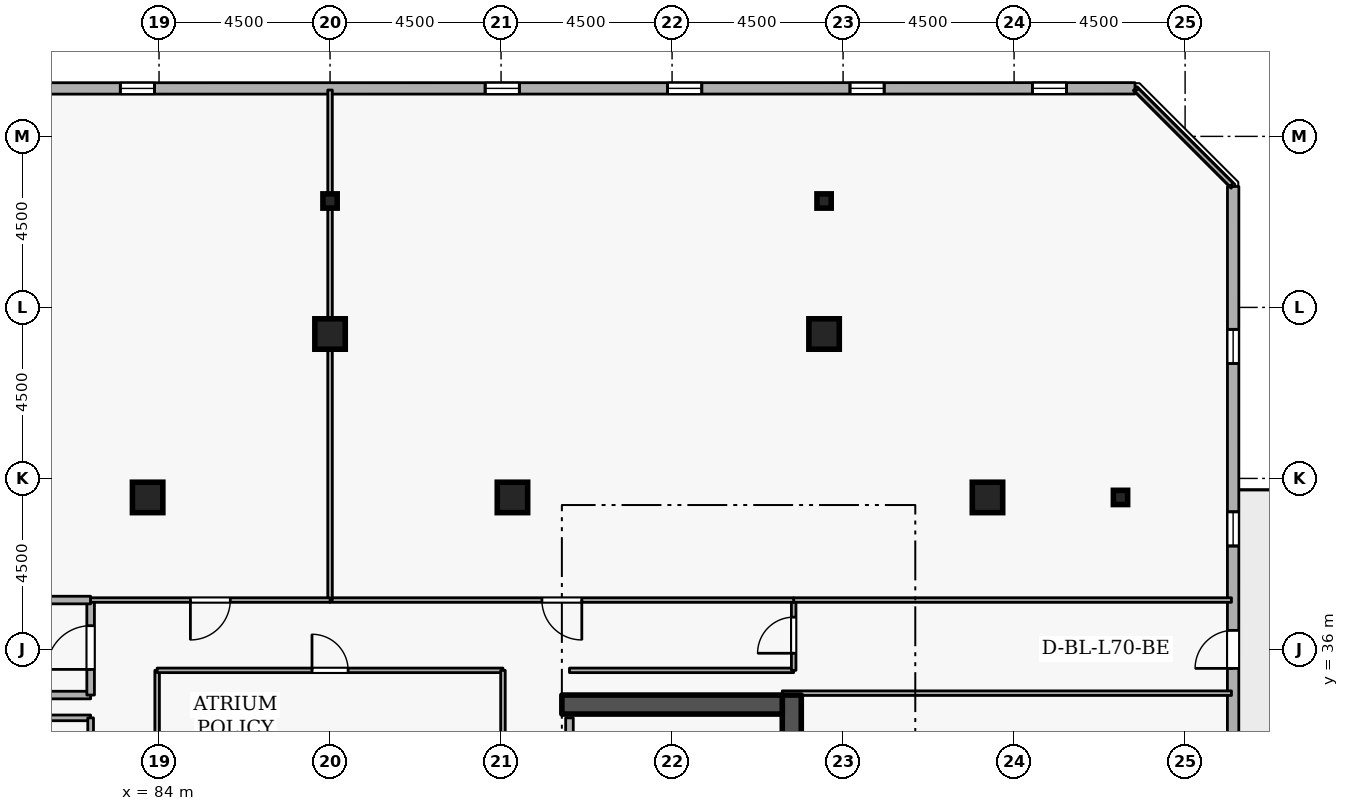
"""IFC4 building model, lengths in metres.
Left out: names, types, materials, properties, quantities, classifications, styles, units other than length and angle.
Written with IfcOpenShell. Run it as: python <this file> out.ifc"""

import sys

from ifc_helpers import new_model, si_unit, direction, frame, frame_2d, origin, origin_2d, place, context, subcontext, project, spatial, rectangle, i_section, extrude, element, fill, save


model = new_model("IFC4")
c1 = context("Model", 3, precision=1e-05, world=origin(), true_north=direction((0.0, 1.0)))
c2 = subcontext(c1, "Body", "Model", "MODEL_VIEW")
j1 = project(units=[si_unit("LENGTHUNIT", "METRE"), si_unit("PLANEANGLEUNIT", "RADIAN")], contexts=[c1])
p1 = place(None, origin())
s1 = spatial("IfcSite", under=j1, at=p1, CompositionType="ELEMENT")
p2 = place(p1, origin())
s2 = spatial("IfcBuilding", under=s1, at=p2, CompositionType="ELEMENT")
p3 = place(p2, frame((0.0, 0.0, 261.9)))
s3 = spatial("IfcBuildingStorey", under=s2, at=p3, CompositionType="ELEMENT", Elevation=261.9)
p4 = place(p3, frame((100.65, 19.2, 0.0), z_axis=(0.0, 0.0, 1.0), x_axis=(0.0, 1.0, 0.0)))
e1 = element("IfcWall", 1, at=p4, inside=s3, PredefinedType="SHEAR", context=c2, shape_type="SweptSolid", body=[
    extrude(rectangle(XDim=15.6, YDim=0.5, at=frame_2d((7.8, 0.0))), origin(), (0.0, 0.0, 1.0), 3.6),
])
p5 = place(p3, frame((94.6, 34.55, 0.0), z_axis=(0.0, 0.0, 1.0), x_axis=(1.0, 0.0, 0.0)))
e2 = element("IfcWall", 2, at=p5, inside=s3, PredefinedType="SHEAR", context=c2, shape_type="SweptSolid", body=[
    extrude(rectangle(XDim=5.8, YDim=0.5, at=frame_2d((2.9, 0.0))), origin(), (0.0, 0.0, 1.0), 3.6),
])
for number, where, z_axis, x_axis in (
    (3, (105.8, 40.0, 0.0), (0.0, 0.0, 1.0), (1.0, 0.0, 0.0)),
    (4, (101.5, 44.3, 0.0), (0.0, 0.0, 1.0), (1.0, 0.0, 0.0)),
    (5, (88.5, 44.3, 0.0), (0.0, 0.0, 1.0), (1.0, 0.0, 0.0)),
    (6, (93.3, 40.0, 0.0), (0.0, 0.0, 1.0), (1.0, 0.0, 0.0)),
    (7, (83.7, 40.0, 0.0), (0.0, 0.0, 1.0), (1.0, 0.0, 0.0)),
):
    element("IfcColumn", number, at=place(p3, frame(where, z_axis=z_axis, x_axis=x_axis)), inside=s3, PredefinedType="COLUMN", context=c2, shape_type="SweptSolid", body=[
        extrude(rectangle(XDim=0.8, YDim=0.8, at=origin_2d()), origin(), (0.0, 0.0, 1.0), 3.6),
    ])
for number, where, z_axis, x_axis in (
    (8, (109.3, 40.0, 0.0), (0.0, 0.0, 1.0), (1.0, 0.0, 0.0)),
    (9, (101.5, 47.8, 0.0), (0.0, 0.0, 1.0), (1.0, 0.0, 0.0)),
    (10, (88.5, 47.8, 0.0), (0.0, 0.0, 1.0), (1.0, 0.0, 0.0)),
):
    element("IfcColumn", number, at=place(p3, frame(where, z_axis=z_axis, x_axis=x_axis)), inside=s3, PredefinedType="COLUMN", context=c2, shape_type="SweptSolid", body=[
        extrude(i_section(OverallWidth=0.375, OverallDepth=0.375, WebThickness=0.017, FlangeThickness=0.027, FilletRadius=0.015, at=origin_2d()), origin(), (0.0, 0.0, 1.0), 3.6),
    ])
p6 = place(p3, frame((112.261, 12.922, 0.0), z_axis=(0.0, 0.0, 1.0), x_axis=(0.000103863011, 0.999999994606, 0.0)))
e11 = element("IfcWall", 11, at=p6, inside=s3, PredefinedType="STANDARD", context=c2, shape_type="SweptSolid", body=[
    extrude(rectangle(XDim=35.259, YDim=0.3, at=frame_2d((17.629, 0.0))), origin(), (0.0, 0.0, 1.0), 2.7),
])
p7 = place(p6, frame((22.58, 0.0, 0.0)))
e12 = element("IfcOpeningElement", 12, at=p7, cuts=e11, PredefinedType="OPENING", context=c2, shape_type="SweptSolid", body=[
    extrude(rectangle(XDim=1.0, YDim=2.08, at=frame_2d((0.5, 1.04))), frame((0.0, 0.16, 0.0), z_axis=(0.0, -1.0, 0.0), x_axis=(1.0, 0.0, 0.0)), (0.0, 0.0, 1.0), 0.32),
])
p8 = place(p6, frame((1.8, 0.0, 0.72)))
e13 = element("IfcOpeningElement", 13, at=p8, cuts=e11, PredefinedType="OPENING", context=c2, shape_type="SweptSolid", body=[
    extrude(rectangle(XDim=0.9, YDim=1.75, at=frame_2d((0.45, 0.875))), frame((0.0, 0.16, 0.0), z_axis=(0.0, -1.0, 0.0), x_axis=(1.0, 0.0, 0.0)), (0.0, 0.0, 1.0), 0.32),
])
p9 = place(p6, frame((6.6, 0.0, 0.72)))
e14 = element("IfcOpeningElement", 14, at=p9, cuts=e11, PredefinedType="OPENING", context=c2, shape_type="SweptSolid", body=[
    extrude(rectangle(XDim=0.9, YDim=1.75, at=frame_2d((0.45, 0.875))), frame((0.0, 0.16, 0.0), z_axis=(0.0, -1.0, 0.0), x_axis=(1.0, 0.0, 0.0)), (0.0, 0.0, 1.0), 0.32),
])
p10 = place(p6, frame((11.4, 0.0, 0.72)))
e15 = element("IfcOpeningElement", 15, at=p10, cuts=e11, PredefinedType="OPENING", context=c2, shape_type="SweptSolid", body=[
    extrude(rectangle(XDim=0.9, YDim=1.75, at=frame_2d((0.45, 0.875))), frame((0.0, 0.16, 0.0), z_axis=(0.0, -1.0, 0.0), x_axis=(1.0, 0.0, 0.0)), (0.0, 0.0, 1.0), 0.32),
])
p11 = place(p6, frame((16.2, 0.0, 0.72)))
e16 = element("IfcOpeningElement", 16, at=p11, cuts=e11, PredefinedType="OPENING", context=c2, shape_type="SweptSolid", body=[
    extrude(rectangle(XDim=0.9, YDim=1.75, at=frame_2d((0.45, 0.875))), frame((0.0, 0.16, 0.0), z_axis=(0.0, -1.0, 0.0), x_axis=(1.0, 0.0, 0.0)), (0.0, 0.0, 1.0), 0.32),
])
p12 = place(p6, frame((25.8, 0.0, 0.72)))
e17 = element("IfcOpeningElement", 17, at=p12, cuts=e11, PredefinedType="OPENING", context=c2, shape_type="SweptSolid", body=[
    extrude(rectangle(XDim=0.9, YDim=1.75, at=frame_2d((0.45, 0.875))), frame((0.0, 0.16, 0.0), z_axis=(0.0, -1.0, 0.0), x_axis=(1.0, 0.0, 0.0)), (0.0, 0.0, 1.0), 0.32),
])
p13 = place(p6, frame((30.6, 0.0, 0.72)))
e18 = element("IfcOpeningElement", 18, at=p13, cuts=e11, PredefinedType="OPENING", context=c2, shape_type="SweptSolid", body=[
    extrude(rectangle(XDim=0.9, YDim=1.75, at=frame_2d((0.45, 0.875))), frame((0.0, 0.16, 0.0), z_axis=(0.0, -1.0, 0.0), x_axis=(1.0, 0.0, 0.0)), (0.0, 0.0, 1.0), 0.32),
])
p14 = place(p3, frame((109.681, 50.765, 0.0), z_axis=(0.0, 0.0, 1.0), x_axis=(-0.999999994606, -0.000103863011, 0.0)))
e19 = element("IfcWall", 19, at=p14, inside=s3, PredefinedType="STANDARD", context=c2, shape_type="SweptSolid", body=[
    extrude(rectangle(XDim=35.259, YDim=0.3, at=frame_2d((17.629, 0.0))), origin(), (0.0, 0.0, 1.0), 2.7),
])
p15 = place(p14, frame((1.8, 0.0, 0.72)))
e20 = element("IfcOpeningElement", 20, at=p15, cuts=e19, PredefinedType="OPENING", context=c2, shape_type="SweptSolid", body=[
    extrude(rectangle(XDim=0.9, YDim=1.75, at=frame_2d((0.45, 0.875))), frame((0.0, 0.16, 0.0), z_axis=(0.0, -1.0, 0.0), x_axis=(1.0, 0.0, 0.0)), (0.0, 0.0, 1.0), 0.32),
])
p16 = place(p14, frame((6.6, 0.0, 0.72)))
e21 = element("IfcOpeningElement", 21, at=p16, cuts=e19, PredefinedType="OPENING", context=c2, shape_type="SweptSolid", body=[
    extrude(rectangle(XDim=0.9, YDim=1.75, at=frame_2d((0.45, 0.875))), frame((0.0, 0.16, 0.0), z_axis=(0.0, -1.0, 0.0), x_axis=(1.0, 0.0, 0.0)), (0.0, 0.0, 1.0), 0.32),
])
p17 = place(p14, frame((11.4, 0.0, 0.72)))
e22 = element("IfcOpeningElement", 22, at=p17, cuts=e19, PredefinedType="OPENING", context=c2, shape_type="SweptSolid", body=[
    extrude(rectangle(XDim=0.9, YDim=1.75, at=frame_2d((0.45, 0.875))), frame((0.0, 0.16, 0.0), z_axis=(0.0, -1.0, 0.0), x_axis=(1.0, 0.0, 0.0)), (0.0, 0.0, 1.0), 0.32),
])
p18 = place(p14, frame((16.2, 0.0, 0.72)))
e23 = element("IfcOpeningElement", 23, at=p18, cuts=e19, PredefinedType="OPENING", context=c2, shape_type="SweptSolid", body=[
    extrude(rectangle(XDim=0.9, YDim=1.75, at=frame_2d((0.45, 0.875))), frame((0.0, 0.16, 0.0), z_axis=(0.0, -1.0, 0.0), x_axis=(1.0, 0.0, 0.0)), (0.0, 0.0, 1.0), 0.32),
])
p19 = place(p14, frame((25.8, 0.0, 0.72)))
e24 = element("IfcOpeningElement", 24, at=p19, cuts=e19, PredefinedType="OPENING", context=c2, shape_type="SweptSolid", body=[
    extrude(rectangle(XDim=0.9, YDim=1.75, at=frame_2d((0.45, 0.875))), frame((0.0, 0.16, 0.0), z_axis=(0.0, -1.0, 0.0), x_axis=(1.0, 0.0, 0.0)), (0.0, 0.0, 1.0), 0.32),
])
p20 = place(p14, frame((30.6, 0.0, 0.72)))
e25 = element("IfcOpeningElement", 25, at=p20, cuts=e19, PredefinedType="OPENING", context=c2, shape_type="SweptSolid", body=[
    extrude(rectangle(XDim=0.9, YDim=1.75, at=frame_2d((0.45, 0.875))), frame((0.0, 0.16, 0.0), z_axis=(0.0, -1.0, 0.0), x_axis=(1.0, 0.0, 0.0)), (0.0, 0.0, 1.0), 0.32),
])
p21 = place(p3, frame((79.9, 34.8, 0.0), z_axis=(0.0, 0.0, 1.0), x_axis=(1.0, 0.0, 0.0)))
e26 = element("IfcWall", 26, at=p21, inside=s3, PredefinedType="STANDARD", context=c2, shape_type="SweptSolid", body=[
    extrude(rectangle(XDim=2.3, YDim=0.2, at=frame_2d((1.15, 0.0))), origin(), (0.0, 0.0, 1.0), 2.545),
])
p22 = place(p3, frame((82.2, 34.8, 0.0), z_axis=(0.0, 0.0, 1.0), x_axis=(0.0, 1.0, 0.0)))
e27 = element("IfcWall", 27, at=p22, inside=s3, PredefinedType="STANDARD", context=c2, shape_type="SweptSolid", body=[
    extrude(rectangle(XDim=2.5, YDim=0.2, at=frame_2d((1.25, 0.0))), origin(), (0.0, 0.0, 1.0), 3.34),
])
p23 = place(p22, frame((0.675, 0.0, 0.0)))
e28 = element("IfcOpeningElement", 28, at=p23, cuts=e27, PredefinedType="OPENING", context=c2, shape_type="SweptSolid", body=[
    extrude(rectangle(XDim=1.15, YDim=2.1, at=frame_2d((0.575, 1.05))), frame((0.0, 0.11, 0.0), z_axis=(0.0, -1.0, 0.0), x_axis=(1.0, 0.0, 0.0)), (0.0, 0.0, 1.0), 0.22),
])
p24 = place(p3, frame((82.2, 37.3, 0.0), z_axis=(0.0, 0.0, 1.0), x_axis=(-1.0, 0.0, 0.0)))
e29 = element("IfcWall", 29, at=p24, inside=s3, PredefinedType="STANDARD", context=c2, shape_type="SweptSolid", body=[
    extrude(rectangle(XDim=5.7, YDim=0.2, at=frame_2d((2.85, 0.0))), origin(), (0.0, 0.0, 1.0), 3.34),
])
p25 = place(p3, frame((94.8, 32.0, 0.0), z_axis=(0.0, 0.0, 1.0), x_axis=(0.0, 1.0, 0.0)))
e30 = element("IfcWall", 30, at=p25, inside=s3, PredefinedType="STANDARD", context=c2, shape_type="SweptSolid", body=[
    extrude(rectangle(XDim=2.2, YDim=0.2, at=frame_2d((1.1, 0.0))), origin(), (0.0, 0.0, 1.0), 3.34),
])
p26 = place(p25, frame((0.525, 0.0, 0.0)))
e31 = element("IfcOpeningElement", 31, at=p26, cuts=e30, PredefinedType="OPENING", context=c2, shape_type="SweptSolid", body=[
    extrude(rectangle(XDim=1.15, YDim=2.1, at=frame_2d((0.575, 1.05))), frame((0.0, 0.11, 0.0), z_axis=(0.0, -1.0, 0.0), x_axis=(1.0, 0.0, 0.0)), (0.0, 0.0, 1.0), 0.22),
])
p27 = place(p3, frame((80.15, 34.2, 0.0), z_axis=(0.0, 0.0, 1.0), x_axis=(1.0, 0.0, 0.0)))
e32 = element("IfcWall", 32, at=p27, inside=s3, PredefinedType="PARTITIONING", context=c2, shape_type="SweptSolid", body=[
    extrude(rectangle(XDim=2.05, YDim=0.15, at=frame_2d((1.025, 0.0))), origin(), (0.0, 0.0, 1.0), 2.545),
])
p28 = place(p3, frame((82.2, 34.2, 0.0), z_axis=(0.0, 0.0, 1.0), x_axis=(0.0, -1.0, 0.0)))
e33 = element("IfcWall", 33, at=p28, inside=s3, PredefinedType="PARTITIONING", context=c2, shape_type="SweptSolid", body=[
    extrude(rectangle(XDim=2.35, YDim=0.15, at=frame_2d((1.175, 0.0))), origin(), (0.0, 0.0, 1.0), 3.34),
])
p29 = place(p28, frame((0.715, 0.0, 0.0)))
e34 = element("IfcOpeningElement", 34, at=p29, cuts=e33, PredefinedType="OPENING", context=c2, shape_type="SweptSolid", body=[
    extrude(rectangle(XDim=0.92, YDim=2.08, at=frame_2d((0.46, 1.04))), frame((0.0, 0.085, 0.0), z_axis=(0.0, -1.0, 0.0), x_axis=(1.0, 0.0, 0.0)), (0.0, 0.0, 1.0), 0.17),
])
p30 = place(p3, frame((94.8, 35.45, 0.0), z_axis=(0.0, 0.0, 1.0), x_axis=(1.0, 0.0, 0.0)))
e35 = element("IfcWall", 35, at=p30, inside=s3, PredefinedType="PARTITIONING", context=c2, shape_type="SweptSolid", body=[
    extrude(rectangle(XDim=5.9, YDim=0.12, at=frame_2d((2.95, 0.0))), origin(), (0.0, 0.0, 1.0), 3.34),
])
p31 = place(p3, frame((100.7, 35.45, 0.0), z_axis=(0.0, 0.0, 1.0), x_axis=(0.0, 1.0, 0.0)))
e36 = element("IfcWall", 36, at=p31, inside=s3, PredefinedType="PARTITIONING", context=c2, shape_type="SweptSolid", body=[
    extrude(rectangle(XDim=1.85, YDim=0.12, at=frame_2d((0.925, 0.0))), origin(), (0.0, 0.0, 1.0), 3.34),
])
p32 = place(p31, frame((0.45, 0.0, 0.0)))
e37 = element("IfcOpeningElement", 37, at=p32, cuts=e36, PredefinedType="OPENING", context=c2, shape_type="SweptSolid", body=[
    extrude(rectangle(XDim=0.95, YDim=2.1, at=frame_2d((0.475, 1.05))), frame((0.0, 0.07, 0.0), z_axis=(0.0, -1.0, 0.0), x_axis=(1.0, 0.0, 0.0)), (0.0, 0.0, 1.0), 0.14),
])
p33 = place(p3, frame((100.7, 37.3, 0.0), z_axis=(0.0, 0.0, 1.0), x_axis=(1.0, 0.0, 0.0)))
e38 = element("IfcWall", 38, at=p33, inside=s3, PredefinedType="PARTITIONING", context=c2, shape_type="SweptSolid", body=[
    extrude(rectangle(XDim=11.52, YDim=0.12, at=frame_2d((5.76, 0.0))), origin(), (0.0, 0.0, 1.0), 3.34),
])
p34 = place(p3, frame((112.22, 34.85, 0.0), z_axis=(0.0, 0.0, 1.0), x_axis=(-1.0, 0.0, 0.0)))
e39 = element("IfcWall", 39, at=p34, inside=s3, PredefinedType="PARTITIONING", context=c2, shape_type="SweptSolid", body=[
    extrude(rectangle(XDim=11.82, YDim=0.12, at=frame_2d((5.91, 0.0))), origin(), (0.0, 0.0, 1.0), 2.545),
])
p35 = place(p3, frame((100.7, 37.3, 0.0), z_axis=(0.0, 0.0, 1.0), x_axis=(-1.0, 0.0, 0.0)))
e40 = element("IfcWall", 40, at=p35, inside=s3, PredefinedType="PARTITIONING", context=c2, shape_type="SweptSolid", body=[
    extrude(rectangle(XDim=12.2, YDim=0.12, at=frame_2d((6.1, 0.0))), origin(), (0.0, 0.0, 1.0), 3.34),
])
p36 = place(p35, frame((5.575, 0.0, 0.0)))
e41 = element("IfcOpeningElement", 41, at=p36, cuts=e40, PredefinedType="OPENING", context=c2, shape_type="SweptSolid", body=[
    extrude(rectangle(XDim=1.05, YDim=2.1, at=frame_2d((0.525, 1.05))), frame((0.0, 0.07, 0.0), z_axis=(0.0, -1.0, 0.0), x_axis=(1.0, 0.0, 0.0)), (0.0, 0.0, 1.0), 0.14),
])
p37 = place(p3, frame((88.5, 37.3, 0.0), z_axis=(0.0, 0.0, 1.0), x_axis=(0.0, 1.0, 0.0)))
e42 = element("IfcWall", 42, at=p37, inside=s3, PredefinedType="PARTITIONING", context=c2, shape_type="SweptSolid", body=[
    extrude(rectangle(XDim=13.42, YDim=0.12, at=frame_2d((6.71, 0.0))), origin(), (0.0, 0.0, 1.0), 2.932),
])
p38 = place(p3, frame((109.725, 50.72, 0.0), z_axis=(0.0, 0.0, 1.0), x_axis=(0.707106781187, -0.707106781187, 0.0)))
e43 = element("IfcWall", 43, at=p38, inside=s3, PredefinedType="PARTITIONING", context=c2, shape_type="SweptSolid", body=[
    extrude(rectangle(XDim=3.528, YDim=0.12, at=frame_2d((1.764, 0.0))), origin(), (0.0, 0.0, 1.0), 3.34),
])
p39 = place(p3, frame((88.5, 37.3, 0.0), z_axis=(0.0, 0.0, 1.0), x_axis=(-1.0, 0.0, 0.0)))
e44 = element("IfcWall", 44, at=p39, inside=s3, PredefinedType="PARTITIONING", context=c2, shape_type="SweptSolid", body=[
    extrude(rectangle(XDim=6.3, YDim=0.12, at=frame_2d((3.15, 0.0))), origin(), (0.0, 0.0, 1.0), 3.34),
])
p40 = place(p39, frame((2.625, 0.0, 0.0)))
e45 = element("IfcOpeningElement", 45, at=p40, cuts=e44, PredefinedType="OPENING", context=c2, shape_type="SweptSolid", body=[
    extrude(rectangle(XDim=1.05, YDim=2.1, at=frame_2d((0.525, 1.05))), frame((0.0, 0.07, 0.0), z_axis=(0.0, -1.0, 0.0), x_axis=(1.0, 0.0, 0.0)), (0.0, 0.0, 1.0), 0.14),
])
p41 = place(p3, frame((83.95, 32.2, 0.0), z_axis=(0.0, 0.0, 1.0), x_axis=(0.0, 1.0, 0.0)))
e46 = element("IfcWall", 46, at=p41, inside=s3, PredefinedType="PARTITIONING", context=c2, shape_type="SweptSolid", body=[
    extrude(rectangle(XDim=3.25, YDim=0.12, at=frame_2d((1.625, 0.0))), origin(), (0.0, 0.0, 1.0), 3.34),
])
p42 = place(p3, frame((83.95, 35.45, 0.0), z_axis=(0.0, 0.0, 1.0), x_axis=(1.0, 0.0, 0.0)))
e47 = element("IfcWall", 47, at=p42, inside=s3, PredefinedType="PARTITIONING", context=c2, shape_type="SweptSolid", body=[
    extrude(rectangle(XDim=9.1, YDim=0.12, at=frame_2d((4.55, 0.0))), origin(), (0.0, 0.0, 1.0), 3.34),
])
p43 = place(p42, frame((4.075, 0.0, 0.0)))
e48 = element("IfcOpeningElement", 48, at=p43, cuts=e47, PredefinedType="OPENING", context=c2, shape_type="SweptSolid", body=[
    extrude(rectangle(XDim=0.95, YDim=2.1, at=frame_2d((0.475, 1.05))), frame((0.0, 0.07, 0.0), z_axis=(0.0, -1.0, 0.0), x_axis=(1.0, 0.0, 0.0)), (0.0, 0.0, 1.0), 0.14),
])
p44 = place(p3, frame((93.05, 35.45, 0.0), z_axis=(0.0, 0.0, 1.0), x_axis=(0.0, -1.0, 0.0)))
e49 = element("IfcWall", 49, at=p44, inside=s3, PredefinedType="PARTITIONING", context=c2, shape_type="SweptSolid", body=[
    extrude(rectangle(XDim=3.25, YDim=0.12, at=frame_2d((1.625, 0.0))), origin(), (0.0, 0.0, 1.0), 3.34),
])
p45 = place(p7, origin())
e50 = element("IfcDoor", 50, at=p45, inside=s3, OperationType="SINGLE_SWING_LEFT", PredefinedType="DOOR", context=c2, shape_type="SweptSolid", body=[
    extrude(rectangle(XDim=1.0, YDim=2.08, at=frame_2d((0.5, 1.04))), frame((0.0, 0.025, 0.0), z_axis=(0.0, -1.0, 0.0), x_axis=(1.0, 0.0, 0.0)), (0.0, 0.0, 1.0), 0.05),
])
fill(e12, e50)
p46 = place(p12, origin())
e51 = element("IfcWindow", 51, at=p46, inside=s3, PartitioningType="SINGLE_PANEL", PredefinedType="WINDOW", context=c2, shape_type="SweptSolid", body=[
    extrude(rectangle(XDim=0.9, YDim=1.75, at=frame_2d((0.45, 0.875))), frame((0.0, 0.03, 0.0), z_axis=(0.0, -1.0, 0.0), x_axis=(1.0, 0.0, 0.0)), (0.0, 0.0, 1.0), 0.06),
])
fill(e17, e51)
p47 = place(p13, origin())
e52 = element("IfcWindow", 52, at=p47, inside=s3, PartitioningType="SINGLE_PANEL", PredefinedType="WINDOW", context=c2, shape_type="SweptSolid", body=[
    extrude(rectangle(XDim=0.9, YDim=1.75, at=frame_2d((0.45, 0.875))), frame((0.0, 0.03, 0.0), z_axis=(0.0, -1.0, 0.0), x_axis=(1.0, 0.0, 0.0)), (0.0, 0.0, 1.0), 0.06),
])
fill(e18, e52)
p48 = place(p15, origin())
e53 = element("IfcWindow", 53, at=p48, inside=s3, PartitioningType="SINGLE_PANEL", PredefinedType="WINDOW", context=c2, shape_type="SweptSolid", body=[
    extrude(rectangle(XDim=0.9, YDim=1.75, at=frame_2d((0.45, 0.875))), frame((0.0, 0.03, 0.0), z_axis=(0.0, -1.0, 0.0), x_axis=(1.0, 0.0, 0.0)), (0.0, 0.0, 1.0), 0.06),
])
fill(e20, e53)
p49 = place(p16, origin())
e54 = element("IfcWindow", 54, at=p49, inside=s3, PartitioningType="SINGLE_PANEL", PredefinedType="WINDOW", context=c2, shape_type="SweptSolid", body=[
    extrude(rectangle(XDim=0.9, YDim=1.75, at=frame_2d((0.45, 0.875))), frame((0.0, 0.03, 0.0), z_axis=(0.0, -1.0, 0.0), x_axis=(1.0, 0.0, 0.0)), (0.0, 0.0, 1.0), 0.06),
])
fill(e21, e54)
p50 = place(p17, origin())
e55 = element("IfcWindow", 55, at=p50, inside=s3, PartitioningType="SINGLE_PANEL", PredefinedType="WINDOW", context=c2, shape_type="SweptSolid", body=[
    extrude(rectangle(XDim=0.9, YDim=1.75, at=frame_2d((0.45, 0.875))), frame((0.0, 0.03, 0.0), z_axis=(0.0, -1.0, 0.0), x_axis=(1.0, 0.0, 0.0)), (0.0, 0.0, 1.0), 0.06),
])
fill(e22, e55)
p51 = place(p18, origin())
e56 = element("IfcWindow", 56, at=p51, inside=s3, PartitioningType="SINGLE_PANEL", PredefinedType="WINDOW", context=c2, shape_type="SweptSolid", body=[
    extrude(rectangle(XDim=0.9, YDim=1.75, at=frame_2d((0.45, 0.875))), frame((0.0, 0.03, 0.0), z_axis=(0.0, -1.0, 0.0), x_axis=(1.0, 0.0, 0.0)), (0.0, 0.0, 1.0), 0.06),
])
fill(e23, e56)
p52 = place(p19, origin())
e57 = element("IfcWindow", 57, at=p52, inside=s3, PartitioningType="SINGLE_PANEL", PredefinedType="WINDOW", context=c2, shape_type="SweptSolid", body=[
    extrude(rectangle(XDim=0.9, YDim=1.75, at=frame_2d((0.45, 0.875))), frame((0.0, 0.03, 0.0), z_axis=(0.0, -1.0, 0.0), x_axis=(1.0, 0.0, 0.0)), (0.0, 0.0, 1.0), 0.06),
])
fill(e24, e57)
p53 = place(p23, origin())
e58 = element("IfcDoor", 58, at=p53, inside=s3, OperationType="SINGLE_SWING_LEFT", PredefinedType="DOOR", context=c2, shape_type="SweptSolid", body=[
    extrude(rectangle(XDim=1.15, YDim=2.1, at=frame_2d((0.575, 1.05))), frame((0.0, 0.025, 0.0), z_axis=(0.0, -1.0, 0.0), x_axis=(1.0, 0.0, 0.0)), (0.0, 0.0, 1.0), 0.05),
])
fill(e28, e58)
p54 = place(p32, origin())
e59 = element("IfcDoor", 59, at=p54, inside=s3, OperationType="SINGLE_SWING_LEFT", PredefinedType="DOOR", context=c2, shape_type="SweptSolid", body=[
    extrude(rectangle(XDim=0.95, YDim=2.1, at=frame_2d((0.475, 1.05))), frame((0.0, 0.025, 0.0), z_axis=(0.0, -1.0, 0.0), x_axis=(1.0, 0.0, 0.0)), (0.0, 0.0, 1.0), 0.05),
])
fill(e37, e59)
p55 = place(p36, origin())
e60 = element("IfcDoor", 60, at=p55, inside=s3, OperationType="SINGLE_SWING_LEFT", PredefinedType="DOOR", context=c2, shape_type="SweptSolid", body=[
    extrude(rectangle(XDim=1.05, YDim=2.1, at=frame_2d((0.525, 1.05))), frame((0.0, 0.025, 0.0), z_axis=(0.0, -1.0, 0.0), x_axis=(1.0, 0.0, 0.0)), (0.0, 0.0, 1.0), 0.05),
])
fill(e41, e60)
p56 = place(p40, origin())
e61 = element("IfcDoor", 61, at=p56, inside=s3, OperationType="SINGLE_SWING_RIGHT", PredefinedType="DOOR", context=c2, shape_type="SweptSolid", body=[
    extrude(rectangle(XDim=1.05, YDim=2.1, at=frame_2d((0.525, 1.05))), frame((0.0, 0.025, 0.0), z_axis=(0.0, -1.0, 0.0), x_axis=(1.0, 0.0, 0.0)), (0.0, 0.0, 1.0), 0.05),
])
fill(e45, e61)
p57 = place(p43, origin())
e62 = element("IfcDoor", 62, at=p57, inside=s3, OperationType="SINGLE_SWING_LEFT", PredefinedType="DOOR", context=c2, shape_type="SweptSolid", body=[
    extrude(rectangle(XDim=0.95, YDim=2.1, at=frame_2d((0.475, 1.05))), frame((0.0, 0.025, 0.0), z_axis=(0.0, -1.0, 0.0), x_axis=(1.0, 0.0, 0.0)), (0.0, 0.0, 1.0), 0.05),
])
fill(e48, e62)
save(model, sys.argv[1])
